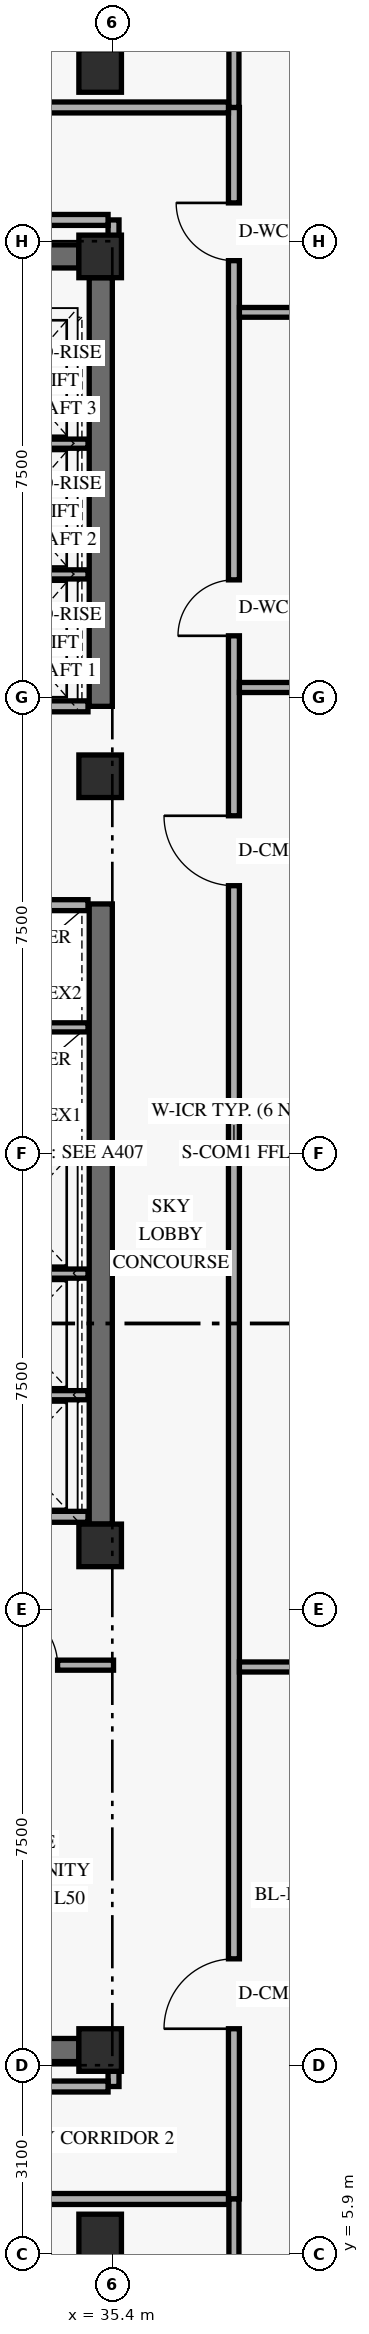
"""IFC4 building model, lengths in metres.
Left out: names, types, materials, properties, quantities, classifications, styles, units other than length and angle.
Written with IfcOpenShell. Run it as: python <this file> out.ifc"""

import sys

from ifc_helpers import new_model, si_unit, direction, frame, frame_2d, origin, origin_2d, place, context, subcontext, project, spatial, rectangle, extrude, element, fill, save


model = new_model("IFC4")
c1 = context("Model", 3, precision=1e-05, world=origin(), true_north=direction((0.0, 1.0)))
c2 = subcontext(c1, "Body", "Model", "MODEL_VIEW")
j1 = project(units=[si_unit("LENGTHUNIT", "METRE"), si_unit("PLANEANGLEUNIT", "RADIAN")], contexts=[c1])
p1 = place(None, origin())
s1 = spatial("IfcSite", under=j1, at=p1, CompositionType="ELEMENT")
p2 = place(p1, origin())
s2 = spatial("IfcBuilding", under=s1, at=p2, CompositionType="ELEMENT")
p3 = place(p2, frame((0.0, 0.0, 192.0)))
s3 = spatial("IfcBuildingStorey", under=s2, at=p3, CompositionType="ELEMENT", Elevation=192.0)
p4 = place(p3, frame((35.21, 17.9, 0.0), z_axis=(0.0, 0.0, 1.0), x_axis=(0.0, 1.0, 0.0)))
e1 = element("IfcWall", 1, at=p4, inside=s3, PredefinedType="SHEAR", context=c2, shape_type="SweptSolid", body=[
    extrude(rectangle(XDim=10.2, YDim=0.38, at=frame_2d((5.1, 0.0))), origin(), (0.0, 0.0, 1.0), 3.348),
])
p5 = place(p3, frame((35.21, 31.35, 0.0), z_axis=(0.0, 0.0, 1.0), x_axis=(0.0, 1.0, 0.0)))
e2 = element("IfcWall", 2, at=p5, inside=s3, PredefinedType="SHEAR", context=c2, shape_type="SweptSolid", body=[
    extrude(rectangle(XDim=7.05, YDim=0.38, at=frame_2d((3.525, 0.0))), origin(), (0.0, 0.0, 1.0), 3.348),
])
for number, where, z_axis, x_axis in (
    (3, (24.55, 9.25, 0.0), (0.0, 0.0, 1.0), (1.0, 0.0, 0.0)),
    (4, (24.55, 38.75, 0.0), (0.0, 0.0, 1.0), (1.0, 0.0, 0.0)),
):
    element("IfcWall", number, at=place(p3, frame(where, z_axis=z_axis, x_axis=x_axis)), inside=s3, PredefinedType="SHEAR", context=c2, shape_type="SweptSolid", body=[
        extrude(rectangle(XDim=10.3, YDim=0.38, at=frame_2d((5.15, 0.0))), origin(), (0.0, 0.0, 1.0), 3.96),
    ])
for number, where, z_axis, x_axis in (
    (5, (35.2, 6.2, 0.0), (0.0, 0.0, 1.0), (1.0, 0.0, 0.0)),
    (6, (35.2, 9.25, 0.0), (0.0, 0.0, 1.0), (1.0, 0.0, 0.0)),
    (7, (35.2, 17.55, 0.0), (0.0, 0.0, 1.0), (1.0, 0.0, 0.0)),
    (8, (35.2, 30.2, 0.0), (0.0, 0.0, 1.0), (1.0, 0.0, 0.0)),
    (9, (35.2, 38.75, 0.0), (0.0, 0.0, 1.0), (1.0, 0.0, 0.0)),
    (10, (35.2, 41.8, 0.0), (0.0, 0.0, 1.0), (1.0, 0.0, 0.0)),
):
    element("IfcColumn", number, at=place(p3, frame(where, z_axis=z_axis, x_axis=x_axis)), inside=s3, PredefinedType="COLUMN", context=c2, shape_type="SweptSolid", body=[
        extrude(rectangle(XDim=0.7, YDim=0.7, at=origin_2d()), origin(), (0.0, 0.0, 1.0), 4.2),
    ])
for number, where, z_axis, x_axis in (
    (11, (32.74, 18.02, 0.0), (0.0, 0.0, 1.0), (1.0, 0.0, 0.0)),
    (12, (32.74, 28.08, 0.0), (0.0, 0.0, 1.0), (1.0, 0.0, 0.0)),
):
    element("IfcWall", number, at=place(p3, frame(where, z_axis=z_axis, x_axis=x_axis)), inside=s3, PredefinedType="STANDARD", context=c2, shape_type="SweptSolid", body=[
        extrude(rectangle(XDim=2.26, YDim=0.18, at=frame_2d((1.13, 0.0))), origin(), (0.0, 0.0, 1.0), 3.96),
    ])
for number, where, z_axis, x_axis in (
    (13, (32.74, 20.02, 0.0), (0.0, 0.0, 1.0), (1.0, 0.0, 0.0)),
    (14, (32.74, 22.02, 0.0), (0.0, 0.0, 1.0), (1.0, 0.0, 0.0)),
    (15, (32.74, 24.05, 0.0), (0.0, 0.0, 1.0), (1.0, 0.0, 0.0)),
    (16, (32.74, 26.07, 0.0), (0.0, 0.0, 1.0), (1.0, 0.0, 0.0)),
):
    element("IfcWall", number, at=place(p3, frame(where, z_axis=z_axis, x_axis=x_axis)), inside=s3, PredefinedType="STANDARD", context=c2, shape_type="SweptSolid", body=[
        extrude(rectangle(XDim=2.26, YDim=0.15, at=frame_2d((1.13, 0.0))), origin(), (0.0, 0.0, 1.0), 3.96),
    ])
p6 = place(p3, frame((32.74, 31.35, 0.0), z_axis=(0.0, 0.0, 1.0), x_axis=(1.0, 0.0, 0.0)))
e17 = element("IfcWall", 17, at=p6, inside=s3, PredefinedType="STANDARD", context=c2, shape_type="SweptSolid", body=[
    extrude(rectangle(XDim=2.26, YDim=0.18, at=frame_2d((1.13, 0.0))), origin(), (0.0, 0.0, 1.0), 3.96),
])
for number, where, z_axis, x_axis in (
    (18, (32.74, 33.52, 0.0), (0.0, 0.0, 1.0), (1.0, 0.0, 0.0)),
    (19, (32.74, 35.67, 0.0), (0.0, 0.0, 1.0), (1.0, 0.0, 0.0)),
):
    element("IfcWall", number, at=place(p3, frame(where, z_axis=z_axis, x_axis=x_axis)), inside=s3, PredefinedType="STANDARD", context=c2, shape_type="SweptSolid", body=[
        extrude(rectangle(XDim=2.26, YDim=0.15, at=frame_2d((1.13, 0.0))), origin(), (0.0, 0.0, 1.0), 3.96),
    ])
p7 = place(p3, frame((37.4, 6.8, 0.0), z_axis=(0.0, 0.0, 1.0), x_axis=(0.0, 1.0, 0.0)))
e20 = element("IfcWall", 20, at=p7, inside=s3, PredefinedType="STANDARD", context=c2, shape_type="SweptSolid", body=[
    extrude(rectangle(XDim=34.4, YDim=0.18, at=frame_2d((17.2, 0.0))), origin(), (0.0, 0.0, 1.0), 3.33),
])
p8 = place(p7, frame((25.71, 0.0, 0.0)))
e21 = element("IfcOpeningElement", 21, at=p8, cuts=e20, PredefinedType="OPENING", context=c2, shape_type="SweptSolid", body=[
    extrude(rectangle(XDim=0.92, YDim=2.14, at=frame_2d((0.46, 1.07))), frame((0.0, 0.1, 0.0), z_axis=(0.0, -1.0, 0.0), x_axis=(1.0, 0.0, 0.0)), (0.0, 0.0, 1.0), 0.2),
])
p9 = place(p7, frame((31.88, 0.0, 0.0)))
e22 = element("IfcOpeningElement", 22, at=p9, cuts=e20, PredefinedType="OPENING", context=c2, shape_type="SweptSolid", body=[
    extrude(rectangle(XDim=0.95, YDim=2.14, at=frame_2d((0.475, 1.07))), frame((0.0, 0.1, 0.0), z_axis=(0.0, -1.0, 0.0), x_axis=(1.0, 0.0, 0.0)), (0.0, 0.0, 1.0), 0.2),
])
p10 = place(p7, frame((2.8, 0.0, 0.0)))
e23 = element("IfcOpeningElement", 23, at=p10, cuts=e20, PredefinedType="OPENING", context=c2, shape_type="SweptSolid", body=[
    extrude(rectangle(XDim=1.15, YDim=2.15, at=frame_2d((0.575, 1.075))), frame((0.0, 0.1, 0.0), z_axis=(0.0, -1.0, 0.0), x_axis=(1.0, 0.0, 0.0)), (0.0, 0.0, 1.0), 0.2),
])
p11 = place(p7, frame((21.6, 0.0, 0.0)))
e24 = element("IfcOpeningElement", 24, at=p11, cuts=e20, PredefinedType="OPENING", context=c2, shape_type="SweptSolid", body=[
    extrude(rectangle(XDim=1.15, YDim=2.15, at=frame_2d((0.575, 1.075))), frame((0.0, 0.1, 0.0), z_axis=(0.0, -1.0, 0.0), x_axis=(1.0, 0.0, 0.0)), (0.0, 0.0, 1.0), 0.2),
])
for number, where, z_axis, x_axis in (
    (25, (37.4, 4.28, 0.0), (0.0, 0.0, 1.0), (0.0, 1.0, 0.0)),
    (26, (37.4, 41.2, 0.0), (0.0, 0.0, 1.0), (0.0, 1.0, 0.0)),
):
    element("IfcWall", number, at=place(p3, frame(where, z_axis=z_axis, x_axis=x_axis)), inside=s3, PredefinedType="PARTITIONING", context=c2, shape_type="SweptSolid", body=[
        extrude(rectangle(XDim=2.52, YDim=0.165, at=frame_2d((1.26, 0.0))), origin(), (0.0, 0.0, 1.0), 3.479),
    ])
for number, where, z_axis, x_axis in (
    (27, (35.42, 8.65, 0.0), (0.0, 0.0, 1.0), (0.0, 1.0, 0.0)),
    (28, (35.42, 38.75, 0.0), (0.0, 0.0, 1.0), (0.0, 1.0, 0.0)),
):
    element("IfcWall", number, at=place(p3, frame(where, z_axis=z_axis, x_axis=x_axis)), inside=s3, PredefinedType="STANDARD", context=c2, shape_type="SweptSolid", body=[
        extrude(rectangle(XDim=0.6, YDim=0.18, at=frame_2d((0.3, 0.0))), origin(), (0.0, 0.0, 1.0), 3.33),
    ])
for number, where, z_axis, x_axis in (
    (29, (37.49, 15.55, 0.0), (0.0, 0.0, 1.0), (1.0, 0.0, 0.0)),
    (30, (37.49, 31.66, 0.0), (0.0, 0.0, 1.0), (1.0, 0.0, 0.0)),
):
    element("IfcWall", number, at=place(p3, frame(where, z_axis=z_axis, x_axis=x_axis)), inside=s3, PredefinedType="PARTITIONING", context=c2, shape_type="SweptSolid", body=[
        extrude(rectangle(XDim=20.83, YDim=0.165, at=frame_2d((10.415, 0.0))), origin(), (0.0, 0.0, 1.0), 3.33),
    ])
p12 = place(p3, frame((37.49, 37.83, 0.0), z_axis=(0.0, 0.0, 1.0), x_axis=(1.0, 0.0, 0.0)))
e31 = element("IfcWall", 31, at=p12, inside=s3, PredefinedType="PLUMBINGWALL", context=c2, shape_type="SweptSolid", body=[
    extrude(rectangle(XDim=5.93, YDim=0.16, at=frame_2d((2.965, 0.0))), origin(), (0.0, 0.0, 1.0), 3.96),
])
p13 = place(p3, frame((32.732, 15.58, 0.0), z_axis=(0.0, 0.0, 1.0), x_axis=(1.0, 0.0, 0.0)))
e32 = element("IfcWall", 32, at=p13, inside=s3, PredefinedType="PARTITIONING", context=c2, shape_type="SweptSolid", body=[
    extrude(rectangle(XDim=2.688, YDim=0.165, at=frame_2d((1.344, 0.0))), origin(), (0.0, 0.0, 1.0), 3.33),
])
p14 = place(p13, frame((0.817, 0.0, 0.0)))
e33 = element("IfcOpeningElement", 33, at=p14, cuts=e32, PredefinedType="OPENING", context=c2, shape_type="SweptSolid", body=[
    extrude(rectangle(XDim=0.95, YDim=2.15, at=frame_2d((0.475, 1.075))), frame((0.0, 0.093, 0.0), z_axis=(0.0, -1.0, 0.0), x_axis=(1.0, 0.0, 0.0)), (0.0, 0.0, 1.0), 0.185),
])
p15 = place(p3, frame((21.74, 6.8, 0.0), z_axis=(0.0, 0.0, 1.0), x_axis=(1.0, 0.0, 0.0)))
e34 = element("IfcWall", 34, at=p15, inside=s3, PredefinedType="STANDARD", context=c2, shape_type="SweptSolid", body=[
    extrude(rectangle(XDim=15.57, YDim=0.18, at=frame_2d((7.785, 0.0))), origin(), (0.0, 0.0, 1.0), 3.33),
])
p16 = place(p15, frame((5.41, 0.0, 0.0)))
e35 = element("IfcOpeningElement", 35, at=p16, cuts=e34, PredefinedType="OPENING", context=c2, shape_type="SweptSolid", body=[
    extrude(rectangle(XDim=0.95, YDim=2.15, at=frame_2d((0.475, 1.075))), frame((0.0, 0.1, 0.0), z_axis=(0.0, -1.0, 0.0), x_axis=(1.0, 0.0, 0.0)), (0.0, 0.0, 1.0), 0.2),
])
p17 = place(p3, frame((23.85, 8.65, 0.0), z_axis=(0.0, 0.0, 1.0), x_axis=(1.0, 0.0, 0.0)))
e36 = element("IfcWall", 36, at=p17, inside=s3, PredefinedType="STANDARD", context=c2, shape_type="SweptSolid", body=[
    extrude(rectangle(XDim=11.48, YDim=0.18, at=frame_2d((5.74, 0.0))), origin(), (0.0, 0.0, 1.0), 3.33),
])
p18 = place(p3, frame((21.74, 41.2, 0.0), z_axis=(0.0, 0.0, 1.0), x_axis=(1.0, 0.0, 0.0)))
e37 = element("IfcWall", 37, at=p18, inside=s3, PredefinedType="STANDARD", context=c2, shape_type="SweptSolid", body=[
    extrude(rectangle(XDim=15.57, YDim=0.18, at=frame_2d((7.785, 0.0))), origin(), (0.0, 0.0, 1.0), 3.33),
])
p19 = place(p18, frame((5.41, 0.0, 0.0)))
e38 = element("IfcOpeningElement", 38, at=p19, cuts=e37, PredefinedType="OPENING", context=c2, shape_type="SweptSolid", body=[
    extrude(rectangle(XDim=0.95, YDim=2.15, at=frame_2d((0.475, 1.075))), frame((0.0, 0.1, 0.0), z_axis=(0.0, -1.0, 0.0), x_axis=(1.0, 0.0, 0.0)), (0.0, 0.0, 1.0), 0.2),
])
p20 = place(p3, frame((23.85, 39.35, 0.0), z_axis=(0.0, 0.0, 1.0), x_axis=(1.0, 0.0, 0.0)))
e39 = element("IfcWall", 39, at=p20, inside=s3, PredefinedType="STANDARD", context=c2, shape_type="SweptSolid", body=[
    extrude(rectangle(XDim=11.48, YDim=0.18, at=frame_2d((5.74, 0.0))), origin(), (0.0, 0.0, 1.0), 3.33),
])
p21 = place(p8, origin())
e40 = element("IfcDoor", 40, at=p21, inside=s3, OperationType="SINGLE_SWING_LEFT", PredefinedType="DOOR", context=c2, shape_type="SweptSolid", body=[
    extrude(rectangle(XDim=0.92, YDim=2.14, at=frame_2d((0.46, 1.07))), frame((0.0, 0.025, 0.0), z_axis=(0.0, -1.0, 0.0), x_axis=(1.0, 0.0, 0.0)), (0.0, 0.0, 1.0), 0.05),
])
fill(e21, e40)
p22 = place(p9, origin())
e41 = element("IfcDoor", 41, at=p22, inside=s3, OperationType="SINGLE_SWING_RIGHT", PredefinedType="DOOR", context=c2, shape_type="SweptSolid", body=[
    extrude(rectangle(XDim=0.95, YDim=2.14, at=frame_2d((0.475, 1.07))), frame((0.0, 0.025, 0.0), z_axis=(0.0, -1.0, 0.0), x_axis=(1.0, 0.0, 0.0)), (0.0, 0.0, 1.0), 0.05),
])
fill(e22, e41)
p23 = place(p14, origin())
e42 = element("IfcDoor", 42, at=p23, inside=s3, OperationType="SINGLE_SWING_LEFT", PredefinedType="DOOR", context=c2, shape_type="SweptSolid", body=[
    extrude(rectangle(XDim=0.95, YDim=2.15, at=frame_2d((0.475, 1.075))), frame((0.0, 0.025, 0.0), z_axis=(0.0, -1.0, 0.0), x_axis=(1.0, 0.0, 0.0)), (0.0, 0.0, 1.0), 0.05),
])
fill(e33, e42)
p24 = place(p10, origin())
e43 = element("IfcDoor", 43, at=p24, inside=s3, OperationType="SINGLE_SWING_LEFT", PredefinedType="DOOR", context=c2, shape_type="SweptSolid", body=[
    extrude(rectangle(XDim=1.15, YDim=2.15, at=frame_2d((0.575, 1.075))), frame((0.0, 0.025, 0.0), z_axis=(0.0, -1.0, 0.0), x_axis=(1.0, 0.0, 0.0)), (0.0, 0.0, 1.0), 0.05),
])
fill(e23, e43)
p25 = place(p11, origin())
e44 = element("IfcDoor", 44, at=p25, inside=s3, OperationType="SINGLE_SWING_RIGHT", PredefinedType="DOOR", context=c2, shape_type="SweptSolid", body=[
    extrude(rectangle(XDim=1.15, YDim=2.15, at=frame_2d((0.575, 1.075))), frame((0.0, 0.025, 0.0), z_axis=(0.0, -1.0, 0.0), x_axis=(1.0, 0.0, 0.0)), (0.0, 0.0, 1.0), 0.05),
])
fill(e24, e44)
save(model, sys.argv[1])
